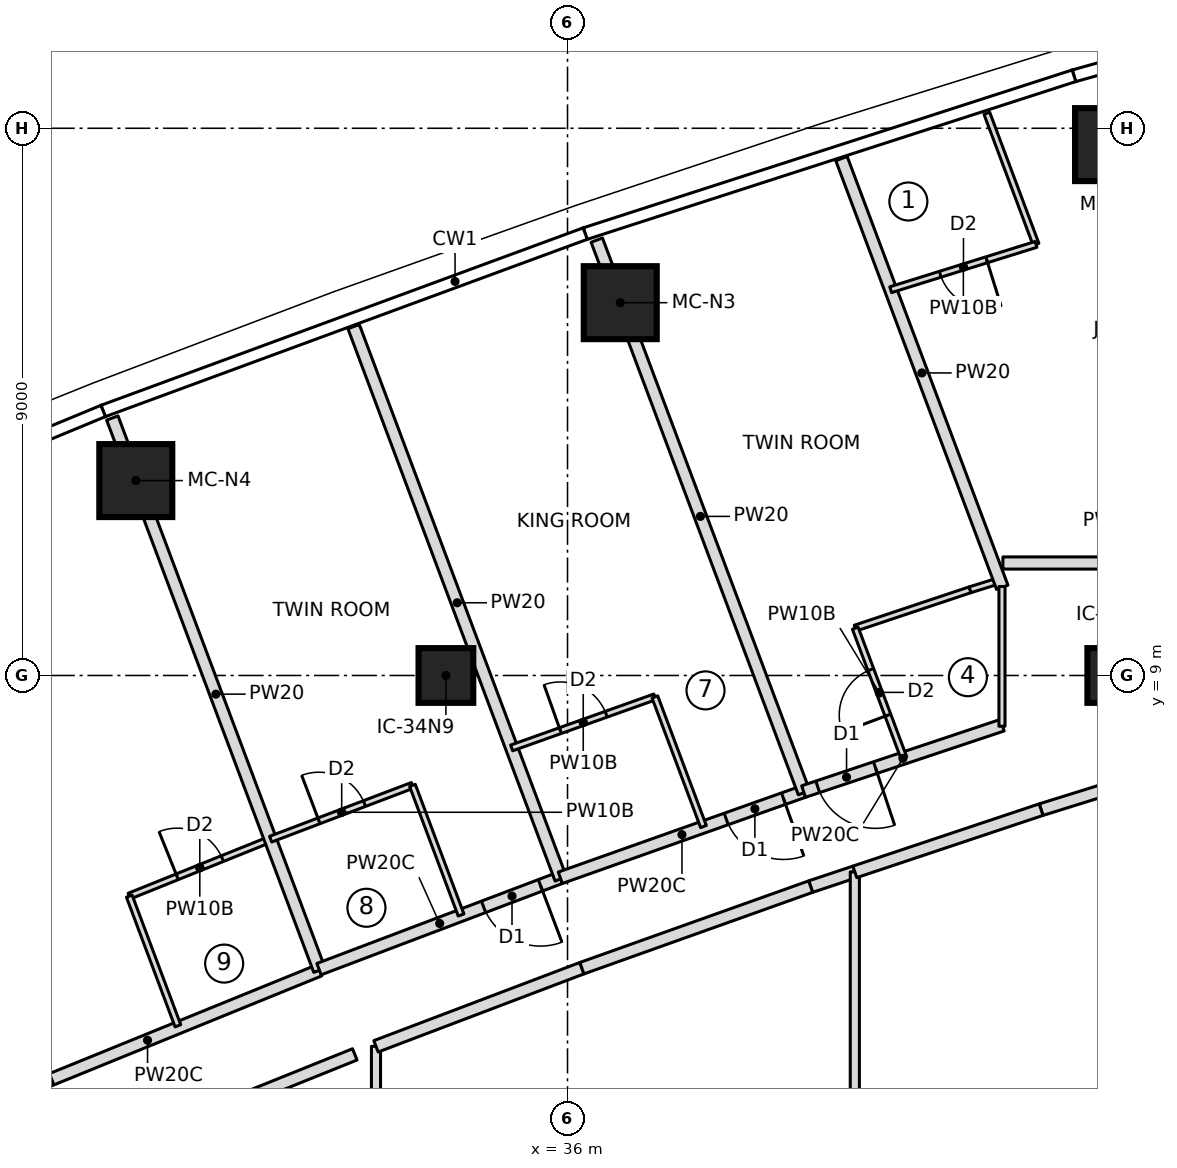
"""IFC4 building model, lengths in metres.
Left out: names, types, materials, properties, quantities, classifications, styles, units other than length and angle.
Written with IfcOpenShell. Run it as: python <this file> out.ifc"""

import sys

from ifc_helpers import new_model, si_unit, direction, frame, frame_2d, origin, origin_2d, place, context, subcontext, project, spatial, rectangle, extrude, element, fill, save


model = new_model("IFC4")
c1 = context("Model", 3, precision=1e-05, world=origin(), true_north=direction((0.0, 1.0)))
c2 = subcontext(c1, "Body", "Model", "MODEL_VIEW")
j1 = project(units=[si_unit("LENGTHUNIT", "METRE"), si_unit("PLANEANGLEUNIT", "RADIAN")], contexts=[c1])
p1 = place(None, origin())
s1 = spatial("IfcSite", under=j1, at=p1, CompositionType="ELEMENT")
p2 = place(p1, origin())
s2 = spatial("IfcBuilding", under=s1, at=p2, CompositionType="ELEMENT")
p3 = place(p2, frame((0.0, 0.0, 252.75)))
s3 = spatial("IfcBuildingStorey", under=s2, at=p3, CompositionType="ELEMENT", Elevation=252.75)
for number, where, z_axis, x_axis in (
    (1, (44.947, 17.731, 0.0), (0.0, 0.0, 1.0), (1.0, 0.0, 0.0)),
    (2, (36.867, 15.132, 0.0), (0.0, 0.0, 1.0), (1.0, 0.0, 0.0)),
    (3, (28.9, 12.205, 0.0), (0.0, 0.0, 1.0), (1.0, 0.0, 0.0)),
):
    element("IfcColumn", number, at=place(p3, frame(where, z_axis=z_axis, x_axis=x_axis)), inside=s3, PredefinedType="COLUMN", context=c2, shape_type="SweptSolid", body=[
        extrude(rectangle(XDim=1.2, YDim=1.2, at=origin_2d()), origin(), (0.0, 0.0, 1.0), 3.55),
    ])
for number, where, z_axis, x_axis in (
    (4, (34.0, 9.0, 0.0), (0.0, 0.0, 1.0), (1.0, 0.0, 0.0)),
    (5, (45.0, 9.0, 0.0), (0.0, 0.0, 1.0), (1.0, 0.0, 0.0)),
):
    element("IfcColumn", number, at=place(p3, frame(where, z_axis=z_axis, x_axis=x_axis)), inside=s3, PredefinedType="COLUMN", context=c2, shape_type="SweptSolid", body=[
        extrude(rectangle(XDim=0.9, YDim=0.9, at=origin_2d()), origin(), (0.0, 0.0, 1.0), 3.55),
    ])
p4 = place(p3, frame((26.266, 1.85, 0.0), z_axis=(0.0, 0.0, 1.0), x_axis=(0.926231512449, 0.376955150311, 0.0)))
e6 = element("IfcWall", 6, at=p4, inside=s3, PredefinedType="PARTITIONING", context=c2, shape_type="SweptSolid", body=[
    extrude(rectangle(XDim=6.105, YDim=0.2, at=frame_2d((3.052, 0.0))), origin(), (0.0, 0.0, 1.0), 3.15),
])
p5 = place(p4, frame((0.35, 0.0, 0.0)))
e7 = element("IfcOpeningElement", 7, at=p5, cuts=e6, PredefinedType="OPENING", context=c2, shape_type="SweptSolid", body=[
    extrude(rectangle(XDim=1.0, YDim=2.1, at=frame_2d((0.5, 1.05))), frame((0.0, 0.11, 0.0), z_axis=(0.0, -1.0, 0.0), x_axis=(1.0, 0.0, 0.0)), (0.0, 0.0, 1.0), 0.22),
])
p6 = place(p3, frame((28.793, 5.372, 0.0), z_axis=(0.0, 0.0, 1.0), x_axis=(0.92761232595, 0.373544338394, 0.0)))
e8 = element("IfcWall", 8, at=p6, inside=s3, PredefinedType="PARTITIONING", context=c2, shape_type="SweptSolid", body=[
    extrude(rectangle(XDim=2.5, YDim=0.1, at=frame_2d((1.25, 0.0))), origin(), (0.0, 0.0, 1.0), 3.15),
])
p7 = place(p6, frame((0.85, 0.0, 0.0)))
e9 = element("IfcOpeningElement", 9, at=p7, cuts=e8, PredefinedType="OPENING", context=c2, shape_type="SweptSolid", body=[
    extrude(rectangle(XDim=0.8, YDim=2.1, at=frame_2d((0.4, 1.05))), frame((0.0, 0.06, 0.0), z_axis=(0.0, -1.0, 0.0), x_axis=(1.0, 0.0, 0.0)), (0.0, 0.0, 1.0), 0.12),
])
p8 = place(p3, frame((29.593, 3.239, 0.0), z_axis=(0.0, 0.0, 1.0), x_axis=(-0.351158682313, 0.936315961541, 0.0)))
e10 = element("IfcWall", 10, at=p8, inside=s3, PredefinedType="PARTITIONING", context=c2, shape_type="SweptSolid", body=[
    extrude(rectangle(XDim=2.278, YDim=0.1, at=frame_2d((1.139, 0.0))), origin(), (0.0, 0.0, 1.0), 3.15),
])
p9 = place(p3, frame((31.92, 4.151, 0.0), z_axis=(0.0, 0.0, 1.0), x_axis=(-0.351126199585, 0.936328143316, 0.0)))
e11 = element("IfcWall", 11, at=p9, inside=s3, PredefinedType="PARTITIONING", context=c2, shape_type="SweptSolid", body=[
    extrude(rectangle(XDim=9.701, YDim=0.2, at=frame_2d((4.851, 0.0))), origin(), (0.0, 0.0, 1.0), 3.15),
])
p10 = place(p3, frame((35.882, 5.673, 0.0), z_axis=(0.0, 0.0, 1.0), x_axis=(-0.935189471058, -0.354147784438, 0.0)))
e12 = element("IfcWall", 12, at=p10, inside=s3, PredefinedType="PARTITIONING", context=c2, shape_type="SweptSolid", body=[
    extrude(rectangle(XDim=4.244, YDim=0.2, at=frame_2d((2.122, 0.0))), origin(), (0.0, 0.0, 1.0), 3.15),
])
p11 = place(p10, frame((0.35, 0.0, 0.0)))
e13 = element("IfcOpeningElement", 13, at=p11, cuts=e12, PredefinedType="OPENING", context=c2, shape_type="SweptSolid", body=[
    extrude(rectangle(XDim=1.0, YDim=2.1, at=frame_2d((0.5, 1.05))), frame((0.0, 0.11, 0.0), z_axis=(0.0, -1.0, 0.0), x_axis=(1.0, 0.0, 0.0)), (0.0, 0.0, 1.0), 0.22),
])
p12 = place(p3, frame((31.117, 6.308, 0.0), z_axis=(0.0, 0.0, 1.0), x_axis=(0.93495051617, 0.354778145202, 0.0)))
e14 = element("IfcWall", 14, at=p12, inside=s3, PredefinedType="PARTITIONING", context=c2, shape_type="SweptSolid", body=[
    extrude(rectangle(XDim=2.495, YDim=0.1, at=frame_2d((1.247, 0.0))), origin(), (0.0, 0.0, 1.0), 3.15),
])
p13 = place(p12, frame((0.85, 0.0, 0.0)))
e15 = element("IfcOpeningElement", 15, at=p13, cuts=e14, PredefinedType="OPENING", context=c2, shape_type="SweptSolid", body=[
    extrude(rectangle(XDim=0.8, YDim=2.1, at=frame_2d((0.4, 1.05))), frame((0.0, 0.06, 0.0), z_axis=(0.0, -1.0, 0.0), x_axis=(1.0, 0.0, 0.0)), (0.0, 0.0, 1.0), 0.12),
])
p14 = place(p3, frame((33.45, 7.193, 0.0), z_axis=(0.0, 0.0, 1.0), x_axis=(0.351135191353, -0.936324771323, 0.0)))
e16 = element("IfcWall", 16, at=p14, inside=s3, PredefinedType="PARTITIONING", context=c2, shape_type="SweptSolid", body=[
    extrude(rectangle(XDim=2.277, YDim=0.1, at=frame_2d((1.139, 0.0))), origin(), (0.0, 0.0, 1.0), 3.15),
])
p15 = place(p3, frame((35.889, 5.654, 0.0), z_axis=(0.0, 0.0, 1.0), x_axis=(-0.351117925717, 0.936331246002, 0.0)))
e17 = element("IfcWall", 17, at=p15, inside=s3, PredefinedType="PARTITIONING", context=c2, shape_type="SweptSolid", body=[
    extrude(rectangle(XDim=9.701, YDim=0.2, at=frame_2d((4.851, 0.0))), origin(), (0.0, 0.0, 1.0), 3.15),
])
p16 = place(p3, frame((39.882, 7.091, 0.0), z_axis=(0.0, 0.0, 1.0), x_axis=(-0.942537055217, -0.334101630559, 0.0)))
e18 = element("IfcWall", 18, at=p16, inside=s3, PredefinedType="PARTITIONING", context=c2, shape_type="SweptSolid", body=[
    extrude(rectangle(XDim=4.244, YDim=0.2, at=frame_2d((2.122, 0.0))), origin(), (0.0, 0.0, 1.0), 3.15),
])
p17 = place(p16, frame((0.35, 0.0, 0.0)))
e19 = element("IfcOpeningElement", 19, at=p17, cuts=e18, PredefinedType="OPENING", context=c2, shape_type="SweptSolid", body=[
    extrude(rectangle(XDim=1.0, YDim=2.1, at=frame_2d((0.5, 1.05))), frame((0.0, 0.11, 0.0), z_axis=(0.0, -1.0, 0.0), x_axis=(1.0, 0.0, 0.0)), (0.0, 0.0, 1.0), 0.22),
])
p18 = place(p3, frame((35.081, 7.808, 0.0), z_axis=(0.0, 0.0, 1.0), x_axis=(0.941896455552, 0.335903359641, 0.0)))
e20 = element("IfcWall", 20, at=p18, inside=s3, PredefinedType="PARTITIONING", context=c2, shape_type="SweptSolid", body=[
    extrude(rectangle(XDim=2.5, YDim=0.1, at=frame_2d((1.25, 0.0))), origin(), (0.0, 0.0, 1.0), 3.15),
])
p19 = place(p18, frame((0.85, 0.0, 0.0)))
e21 = element("IfcOpeningElement", 21, at=p19, cuts=e20, PredefinedType="OPENING", context=c2, shape_type="SweptSolid", body=[
    extrude(rectangle(XDim=0.8, YDim=2.1, at=frame_2d((0.4, 1.05))), frame((0.0, 0.06, 0.0), z_axis=(0.0, -1.0, 0.0), x_axis=(1.0, 0.0, 0.0)), (0.0, 0.0, 1.0), 0.12),
])
p20 = place(p3, frame((37.436, 8.648, 0.0), z_axis=(0.0, 0.0, 1.0), x_axis=(0.351229183496, -0.936289517543, 0.0)))
e22 = element("IfcWall", 22, at=p20, inside=s3, PredefinedType="PARTITIONING", context=c2, shape_type="SweptSolid", body=[
    extrude(rectangle(XDim=2.277, YDim=0.1, at=frame_2d((1.139, 0.0))), origin(), (0.0, 0.0, 1.0), 3.15),
])
p21 = place(p3, frame((39.889, 7.072, 0.0), z_axis=(0.0, 0.0, 1.0), x_axis=(-0.35112895446, 0.936327110224, 0.0)))
e23 = element("IfcWall", 23, at=p21, inside=s3, PredefinedType="PARTITIONING", context=c2, shape_type="SweptSolid", body=[
    extrude(rectangle(XDim=9.706, YDim=0.2, at=frame_2d((4.853, 0.0))), origin(), (0.0, 0.0, 1.0), 3.15),
])
p22 = place(p3, frame((43.15, 8.183, 0.0), z_axis=(0.0, 0.0, 1.0), x_axis=(-0.948477584784, -0.316844238013, 0.0)))
e24 = element("IfcWall", 24, at=p22, inside=s3, PredefinedType="PARTITIONING", context=c2, shape_type="SweptSolid", body=[
    extrude(rectangle(XDim=3.445, YDim=0.2, at=frame_2d((1.723, 0.0))), origin(), (0.0, 0.0, 1.0), 3.15),
])
p23 = place(p22, frame((2.2, 0.0, 0.0)))
e25 = element("IfcOpeningElement", 25, at=p23, cuts=e24, PredefinedType="OPENING", context=c2, shape_type="SweptSolid", body=[
    extrude(rectangle(XDim=1.0, YDim=2.1, at=frame_2d((0.5, 1.05))), frame((0.0, 0.11, 0.0), z_axis=(0.0, -1.0, 0.0), x_axis=(1.0, 0.0, 0.0)), (0.0, 0.0, 1.0), 0.22),
])
p24 = place(p3, frame((40.732, 9.779, 0.0), z_axis=(0.0, 0.0, 1.0), x_axis=(0.948499248693, 0.316779379426, 0.0)))
e26 = element("IfcWall", 26, at=p24, inside=s3, PredefinedType="PARTITIONING", context=c2, shape_type="SweptSolid", body=[
    extrude(rectangle(XDim=1.991, YDim=0.1, at=frame_2d((0.996, 0.0))), origin(), (0.0, 0.0, 1.0), 3.15),
])
p25 = place(p3, frame((42.621, 10.409, 0.0), z_axis=(0.0, 0.0, 1.0), x_axis=(0.954624465478, 0.297812239356, 0.0)))
e27 = element("IfcWall", 27, at=p25, inside=s3, PredefinedType="PARTITIONING", context=c2, shape_type="SweptSolid", body=[
    extrude(rectangle(XDim=0.511, YDim=0.1, at=frame_2d((0.255, 0.0))), origin(), (0.0, 0.0, 1.0), 3.15),
])
p26 = place(p3, frame((41.532, 7.645, 0.0), z_axis=(0.0, 0.0, 1.0), x_axis=(-0.351146927505, 0.936320370014, 0.0)))
e28 = element("IfcWall", 28, at=p26, inside=s3, PredefinedType="PARTITIONING", context=c2, shape_type="SweptSolid", body=[
    extrude(rectangle(XDim=2.278, YDim=0.1, at=frame_2d((1.139, 0.0))), origin(), (0.0, 0.0, 1.0), 3.15),
])
p27 = place(p26, frame((0.75, 0.0, 0.0)))
e29 = element("IfcOpeningElement", 29, at=p27, cuts=e28, PredefinedType="OPENING", context=c2, shape_type="SweptSolid", body=[
    extrude(rectangle(XDim=0.8, YDim=2.1, at=frame_2d((0.4, 1.05))), frame((0.0, 0.06, 0.0), z_axis=(0.0, -1.0, 0.0), x_axis=(1.0, 0.0, 0.0)), (0.0, 0.0, 1.0), 0.12),
])
p28 = place(p3, frame((43.15, 10.45, 0.0), z_axis=(0.0, 0.0, 1.0), x_axis=(-0.351119888923, 0.936330509811, 0.0)))
e30 = element("IfcWall", 30, at=p28, inside=s3, PredefinedType="PARTITIONING", context=c2, shape_type="SweptSolid", body=[
    extrude(rectangle(XDim=7.531, YDim=0.2, at=frame_2d((3.766, 0.0))), origin(), (0.0, 0.0, 1.0), 3.15),
])
p29 = place(p3, frame((42.896, 18.247, 0.0), z_axis=(0.0, 0.0, 1.0), x_axis=(0.351111827312, -0.936333532841, 0.0)))
e31 = element("IfcWall", 31, at=p29, inside=s3, PredefinedType="PARTITIONING", context=c2, shape_type="SweptSolid", body=[
    extrude(rectangle(XDim=2.304, YDim=0.1, at=frame_2d((1.152, 0.0))), origin(), (0.0, 0.0, 1.0), 3.15),
])
p30 = place(p3, frame((43.705, 16.09, 0.0), z_axis=(0.0, 0.0, 1.0), x_axis=(-0.954665433195, -0.297680887299, 0.0)))
e32 = element("IfcWall", 32, at=p30, inside=s3, PredefinedType="PARTITIONING", context=c2, shape_type="SweptSolid", body=[
    extrude(rectangle(XDim=2.504, YDim=0.1, at=frame_2d((1.252, 0.0))), origin(), (0.0, 0.0, 1.0), 3.15),
])
p31 = place(p30, frame((0.85, 0.0, 0.0)))
e33 = element("IfcOpeningElement", 33, at=p31, cuts=e32, PredefinedType="OPENING", context=c2, shape_type="SweptSolid", body=[
    extrude(rectangle(XDim=0.8, YDim=2.1, at=frame_2d((0.4, 1.05))), frame((0.0, 0.06, 0.0), z_axis=(0.0, -1.0, 0.0), x_axis=(1.0, 0.0, 0.0)), (0.0, 0.0, 1.0), 0.12),
])
p32 = place(p3, frame((29.85, 1.701, 0.0), z_axis=(0.0, 0.0, 1.0), x_axis=(0.927620073141, 0.373525099433, 0.0)))
e34 = element("IfcWall", 34, at=p32, inside=s3, PredefinedType="PARTITIONING", context=c2, shape_type="SweptSolid", body=[
    extrude(rectangle(XDim=2.858, YDim=0.2, at=frame_2d((1.429, 0.0))), origin(), (0.0, 0.0, 1.0), 3.15),
])
p33 = place(p3, frame((32.85, -2.901, 0.0), z_axis=(0.0, 0.0, 1.0), x_axis=(0.0, 1.0, 0.0)))
e35 = element("IfcWall", 35, at=p33, inside=s3, PredefinedType="PARTITIONING", context=c2, shape_type="SweptSolid", body=[
    extrude(rectangle(XDim=5.801, YDim=0.15, at=frame_2d((2.901, 0.0))), origin(), (0.0, 0.0, 1.0), 3.15),
])
p34 = place(p3, frame((39.999, 5.527, 0.0), z_axis=(0.0, 0.0, 1.0), x_axis=(0.948395804395, 0.317088943683, 0.0)))
e36 = element("IfcWall", 36, at=p34, inside=s3, PredefinedType="PARTITIONING", context=c2, shape_type="SweptSolid", body=[
    extrude(rectangle(XDim=0.765, YDim=0.2, at=frame_2d((0.383, 0.0))), origin(), (0.0, 0.0, 1.0), 3.15),
])
p35 = place(p3, frame((32.85, 2.901, 0.0), z_axis=(0.0, 0.0, 1.0), x_axis=(0.934953584606, 0.354770058816, 0.0)))
e37 = element("IfcWall", 37, at=p35, inside=s3, PredefinedType="PARTITIONING", context=c2, shape_type="SweptSolid", body=[
    extrude(rectangle(XDim=3.622, YDim=0.2, at=frame_2d((1.811, 0.0))), origin(), (0.0, 0.0, 1.0), 3.15),
])
p36 = place(p3, frame((36.236, 4.186, 0.0), z_axis=(0.0, 0.0, 1.0), x_axis=(0.941909090846, 0.335867927288, 0.0)))
e38 = element("IfcWall", 38, at=p36, inside=s3, PredefinedType="PARTITIONING", context=c2, shape_type="SweptSolid", body=[
    extrude(rectangle(XDim=3.995, YDim=0.2, at=frame_2d((1.998, 0.0))), origin(), (0.0, 0.0, 1.0), 3.15),
])
p37 = place(p3, frame((40.725, -5.77, 0.0), z_axis=(0.0, 0.0, 1.0), x_axis=(0.0, 1.0, 0.0)))
e39 = element("IfcWall", 39, at=p37, inside=s3, PredefinedType="PARTITIONING", context=c2, shape_type="SweptSolid", body=[
    extrude(rectangle(XDim=11.54, YDim=0.15, at=frame_2d((5.77, 0.0))), origin(), (0.0, 0.0, 1.0), 3.15),
])
p38 = place(p3, frame((43.788, 6.793, 0.0), z_axis=(0.0, 0.0, 1.0), x_axis=(0.954693570678, 0.29759063511, 0.0)))
e40 = element("IfcWall", 40, at=p38, inside=s3, PredefinedType="PARTITIONING", context=c2, shape_type="SweptSolid", body=[
    extrude(rectangle(XDim=1.198, YDim=0.2, at=frame_2d((0.599, 0.0))), origin(), (0.0, 0.0, 1.0), 3.15),
])
p39 = place(p3, frame((40.725, 5.77, 0.0), z_axis=(0.0, 0.0, 1.0), x_axis=(0.948486568618, 0.316817343515, 0.0)))
e41 = element("IfcWall", 41, at=p39, inside=s3, PredefinedType="PARTITIONING", context=c2, shape_type="SweptSolid", body=[
    extrude(rectangle(XDim=3.229, YDim=0.2, at=frame_2d((1.615, 0.0))), origin(), (0.0, 0.0, 1.0), 3.15),
])
p40 = place(p3, frame((43.145, 10.463, 0.0), z_axis=(0.0, 0.0, 1.0), x_axis=(0.0, -1.0, 0.0)))
e42 = element("IfcWall", 42, at=p40, inside=s3, PredefinedType="PARTITIONING", context=c2, shape_type="SweptSolid", body=[
    extrude(rectangle(XDim=2.298, YDim=0.1, at=frame_2d((1.149, 0.0))), origin(), (0.0, 0.0, 1.0), 3.15),
])
p41 = place(p3, frame((43.16, 10.85, 0.0), z_axis=(0.0, 0.0, 1.0), x_axis=(1.0, 0.0, 0.0)))
e43 = element("IfcWall", 43, at=p41, inside=s3, PredefinedType="PARTITIONING", context=c2, shape_type="SweptSolid", body=[
    extrude(rectangle(XDim=3.54, YDim=0.2, at=frame_2d((1.77, 0.0))), origin(), (0.0, 0.0, 1.0), 3.15),
])
p42 = place(p7, origin())
e44 = element("IfcDoor", 44, at=p42, inside=s3, OperationType="SINGLE_SWING_LEFT", PredefinedType="DOOR", context=c2, shape_type="SweptSolid", body=[
    extrude(rectangle(XDim=0.8, YDim=2.1, at=frame_2d((0.4, 1.05))), frame((0.0, 0.025, 0.0), z_axis=(0.0, -1.0, 0.0), x_axis=(1.0, 0.0, 0.0)), (0.0, 0.0, 1.0), 0.05),
])
fill(e9, e44)
p43 = place(p5, origin())
e45 = element("IfcDoor", 45, at=p43, inside=s3, OperationType="SINGLE_SWING_LEFT", PredefinedType="DOOR", context=c2, shape_type="SweptSolid", body=[
    extrude(rectangle(XDim=1.0, YDim=2.1, at=frame_2d((0.5, 1.05))), frame((0.0, 0.025, 0.0), z_axis=(0.0, -1.0, 0.0), x_axis=(1.0, 0.0, 0.0)), (0.0, 0.0, 1.0), 0.05),
])
fill(e7, e45)
p44 = place(p13, origin())
e46 = element("IfcDoor", 46, at=p44, inside=s3, OperationType="SINGLE_SWING_LEFT", PredefinedType="DOOR", context=c2, shape_type="SweptSolid", body=[
    extrude(rectangle(XDim=0.8, YDim=2.1, at=frame_2d((0.4, 1.05))), frame((0.0, 0.025, 0.0), z_axis=(0.0, -1.0, 0.0), x_axis=(1.0, 0.0, 0.0)), (0.0, 0.0, 1.0), 0.05),
])
fill(e15, e46)
p45 = place(p11, origin())
e47 = element("IfcDoor", 47, at=p45, inside=s3, OperationType="SINGLE_SWING_LEFT", PredefinedType="DOOR", context=c2, shape_type="SweptSolid", body=[
    extrude(rectangle(XDim=1.0, YDim=2.1, at=frame_2d((0.5, 1.05))), frame((0.0, 0.025, 0.0), z_axis=(0.0, -1.0, 0.0), x_axis=(1.0, 0.0, 0.0)), (0.0, 0.0, 1.0), 0.05),
])
fill(e13, e47)
p46 = place(p19, origin())
e48 = element("IfcDoor", 48, at=p46, inside=s3, OperationType="SINGLE_SWING_LEFT", PredefinedType="DOOR", context=c2, shape_type="SweptSolid", body=[
    extrude(rectangle(XDim=0.8, YDim=2.1, at=frame_2d((0.4, 1.05))), frame((0.0, 0.025, 0.0), z_axis=(0.0, -1.0, 0.0), x_axis=(1.0, 0.0, 0.0)), (0.0, 0.0, 1.0), 0.05),
])
fill(e21, e48)
p47 = place(p17, origin())
e49 = element("IfcDoor", 49, at=p47, inside=s3, OperationType="SINGLE_SWING_LEFT", PredefinedType="DOOR", context=c2, shape_type="SweptSolid", body=[
    extrude(rectangle(XDim=1.0, YDim=2.1, at=frame_2d((0.5, 1.05))), frame((0.0, 0.025, 0.0), z_axis=(0.0, -1.0, 0.0), x_axis=(1.0, 0.0, 0.0)), (0.0, 0.0, 1.0), 0.05),
])
fill(e19, e49)
p48 = place(p27, origin())
e50 = element("IfcDoor", 50, at=p48, inside=s3, OperationType="SINGLE_SWING_LEFT", PredefinedType="DOOR", context=c2, shape_type="SweptSolid", body=[
    extrude(rectangle(XDim=0.8, YDim=2.1, at=frame_2d((0.4, 1.05))), frame((0.0, 0.025, 0.0), z_axis=(0.0, -1.0, 0.0), x_axis=(1.0, 0.0, 0.0)), (0.0, 0.0, 1.0), 0.05),
])
fill(e29, e50)
p49 = place(p23, origin())
e51 = element("IfcDoor", 51, at=p49, inside=s3, OperationType="SINGLE_SWING_LEFT", PredefinedType="DOOR", context=c2, shape_type="SweptSolid", body=[
    extrude(rectangle(XDim=1.0, YDim=2.1, at=frame_2d((0.5, 1.05))), frame((0.0, 0.025, 0.0), z_axis=(0.0, -1.0, 0.0), x_axis=(1.0, 0.0, 0.0)), (0.0, 0.0, 1.0), 0.05),
])
fill(e25, e51)
p50 = place(p31, origin())
e52 = element("IfcDoor", 52, at=p50, inside=s3, OperationType="SINGLE_SWING_LEFT", PredefinedType="DOOR", context=c2, shape_type="SweptSolid", body=[
    extrude(rectangle(XDim=0.8, YDim=2.1, at=frame_2d((0.4, 1.05))), frame((0.0, 0.025, 0.0), z_axis=(0.0, -1.0, 0.0), x_axis=(1.0, 0.0, 0.0)), (0.0, 0.0, 1.0), 0.05),
])
fill(e33, e52)
save(model, sys.argv[1])
